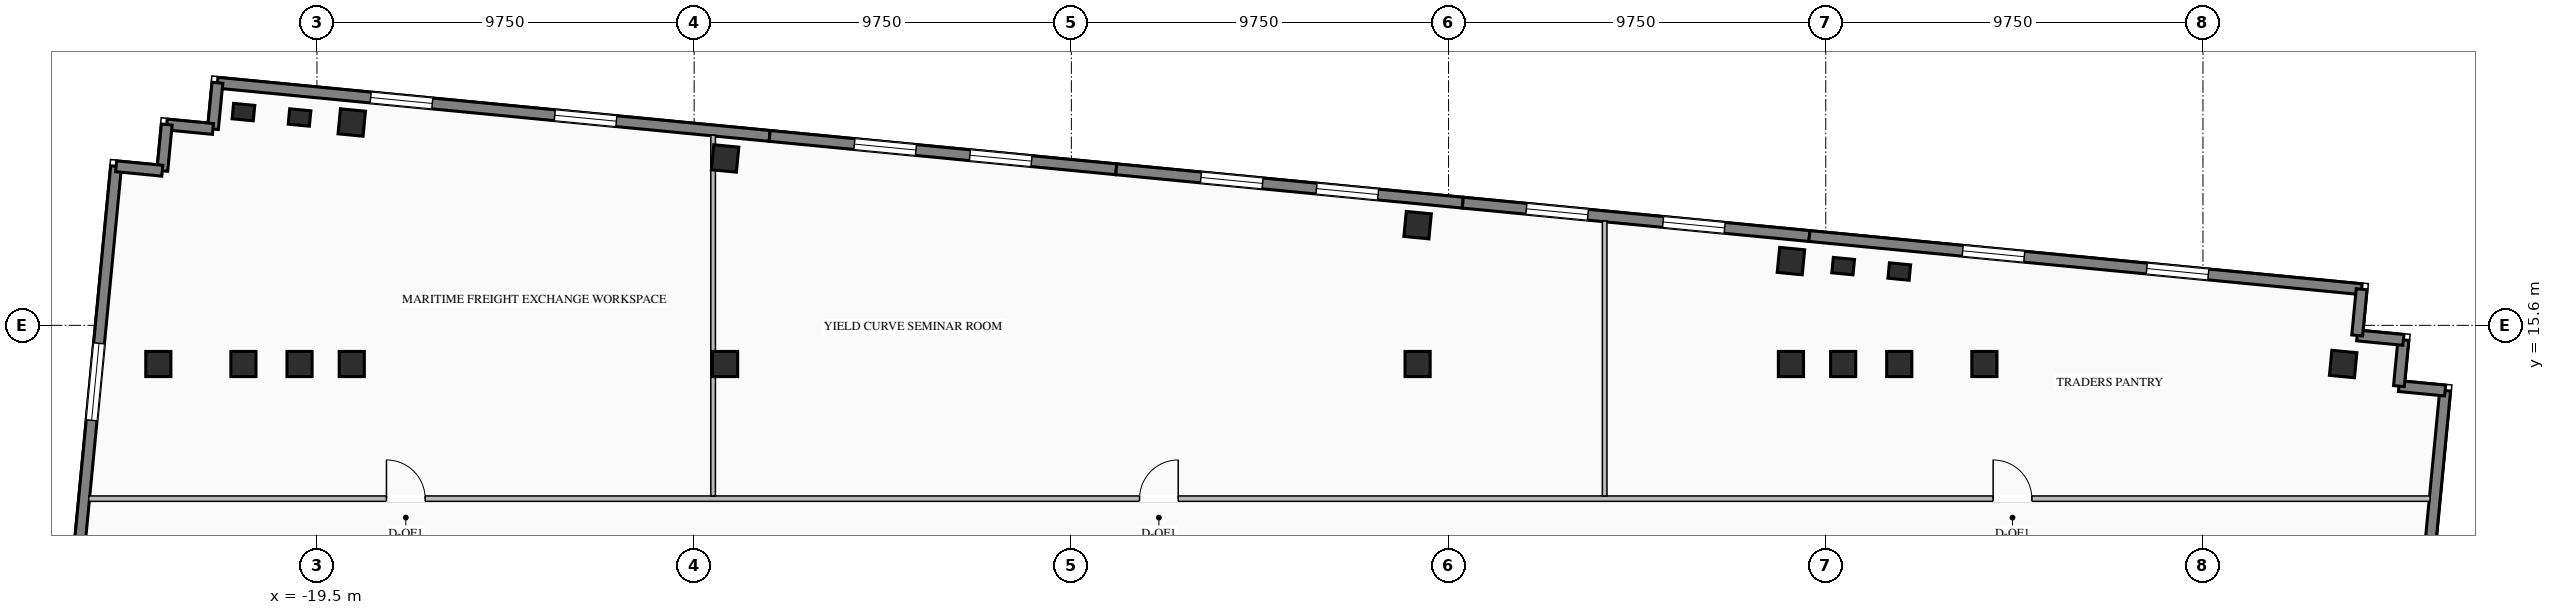
"""IFC4 building model, lengths in metres.
Left out: names, types, materials, properties, quantities, classifications, styles, units other than length and angle.
Written with IfcOpenShell. Run it as: python <this file> out.ifc"""

import sys

from ifc_helpers import new_model, si_unit, direction, frame, frame_2d, origin, origin_2d, place, context, subcontext, project, spatial, rectangle, i_section, extrude, element, fill, save


model = new_model("IFC4")
c1 = context("Model", 3, precision=1e-05, world=origin(), true_north=direction((0.0, 1.0)))
c2 = subcontext(c1, "Body", "Model", "MODEL_VIEW")
j1 = project(units=[si_unit("LENGTHUNIT", "METRE"), si_unit("PLANEANGLEUNIT", "RADIAN")], contexts=[c1])
p1 = place(None, origin())
s1 = spatial("IfcSite", under=j1, at=p1, CompositionType="ELEMENT")
p2 = place(p1, origin())
s2 = spatial("IfcBuilding", under=s1, at=p2, CompositionType="ELEMENT")
p3 = place(p2, frame((0.0, 0.0, 160.4)))
s3 = spatial("IfcBuildingStorey", under=s2, at=p3, CompositionType="ELEMENT", Elevation=160.4)
for number, where, z_axis, x_axis in (
    (1, (-21.4, 14.6, 0.0), (0.0, 0.0, 1.0), (1.0, 0.0, 0.0)),
    (2, (-19.95, 14.6, 0.0), (0.0, 0.0, 1.0), (1.0, 0.0, 0.0)),
    (3, (-18.6, 14.6, 0.0), (0.0, 0.0, 1.0), (1.0, 0.0, 0.0)),
    (4, (-8.95, 14.6, 0.0), (0.0, 0.0, 1.0), (1.0, 0.0, 0.0)),
    (5, (8.95, 14.6, 0.0), (0.0, 0.0, 1.0), (1.0, 0.0, 0.0)),
    (6, (18.6, 14.6, 0.0), (0.0, 0.0, 1.0), (1.0, 0.0, 0.0)),
    (7, (19.95, 14.6, 0.0), (0.0, 0.0, 1.0), (1.0, 0.0, 0.0)),
    (8, (21.4, 14.6, 0.0), (0.0, 0.0, 1.0), (1.0, 0.0, 0.0)),
    (9, (-23.6, 14.6, 0.0), (0.0, 0.0, 1.0), (1.0, 0.0, 0.0)),
    (10, (23.6, 14.6, 0.0), (0.0, 0.0, 1.0), (1.0, 0.0, 0.0)),
    (11, (-18.6, 20.842, 0.0), (0.0, 0.0, 1.0), (0.995, -0.096, 0.0)),
    (12, (-8.95, 19.913, 0.0), (0.0, 0.0, 1.0), (0.995, -0.096, 0.0)),
    (13, (8.95, 18.19, 0.0), (0.0, 0.0, 1.0), (0.995, -0.096, 0.0)),
    (14, (18.6, 17.26, 0.0), (0.0, 0.0, 1.0), (0.995, -0.096, 0.0)),
    (15, (32.874, 14.6, 0.0), (0.0, 0.0, 1.0), (0.995, -0.096, 0.0)),
):
    element("IfcColumn", number, at=place(p3, frame(where, z_axis=z_axis, x_axis=x_axis)), inside=s3, PredefinedType="COLUMN", context=c2, shape_type="SweptSolid", body=[
        extrude(i_section(OverallWidth=0.65, OverallDepth=0.65, WebThickness=0.028, FlangeThickness=0.04, at=origin_2d()), origin(), (0.0, 0.0, 1.0), 3.45),
    ])
for number, where, z_axis, x_axis in (
    (16, (-21.4, 21.112, 0.0), (0.0, 0.0, 1.0), (0.995, -0.096, 0.0)),
    (17, (-19.95, 20.972, 0.0), (0.0, 0.0, 1.0), (0.995, -0.096, 0.0)),
    (18, (19.95, 17.131, 0.0), (0.0, 0.0, 1.0), (0.995, -0.096, 0.0)),
    (19, (21.4, 16.991, 0.0), (0.0, 0.0, 1.0), (0.995, -0.096, 0.0)),
):
    element("IfcColumn", number, at=place(p3, frame(where, z_axis=z_axis, x_axis=x_axis)), inside=s3, PredefinedType="PILASTER", context=c2, shape_type="SweptSolid", body=[
        extrude(rectangle(XDim=0.55, YDim=0.4, at=origin_2d()), origin(), (0.0, 0.0, 1.0), 3.45),
    ])
p4 = place(p3, frame((-22.073, 21.87, 0.0), z_axis=(0.0, 0.0, 1.0), x_axis=(0.995395606285, -0.095851901334, 0.0)))
e20 = element("IfcWall", 20, at=p4, inside=s3, PredefinedType="STANDARD", context=c2, shape_type="SweptSolid", body=[
    extrude(rectangle(XDim=14.34, YDim=0.28, at=frame_2d((7.17, 0.0))), origin(), (0.0, 0.0, 1.0), 3.25),
])
p5 = place(p4, frame((3.98, 0.0, 0.76)))
e21 = element("IfcOpeningElement", 21, at=p5, cuts=e20, PredefinedType="OPENING", context=c2, shape_type="SweptSolid", body=[
    extrude(rectangle(XDim=1.6, YDim=1.95, at=frame_2d((0.8, 0.975))), frame((0.0, 0.15, 0.0), z_axis=(0.0, -1.0, 0.0), x_axis=(1.0, 0.0, 0.0)), (0.0, 0.0, 1.0), 0.3),
])
p6 = place(p4, frame((8.76, 0.0, 0.76)))
e22 = element("IfcOpeningElement", 22, at=p6, cuts=e20, PredefinedType="OPENING", context=c2, shape_type="SweptSolid", body=[
    extrude(rectangle(XDim=1.6, YDim=1.95, at=frame_2d((0.8, 0.975))), frame((0.0, 0.15, 0.0), z_axis=(0.0, -1.0, 0.0), x_axis=(1.0, 0.0, 0.0)), (0.0, 0.0, 1.0), 0.3),
])
p7 = place(p3, frame((-7.799, 20.496, 0.0), z_axis=(0.0, 0.0, 1.0), x_axis=(0.995396794462, -0.09583956164, 0.0)))
e23 = element("IfcWall", 23, at=p7, inside=s3, PredefinedType="STANDARD", context=c2, shape_type="SweptSolid", body=[
    extrude(rectangle(XDim=9.0, YDim=0.28, at=frame_2d((4.5, 0.0))), origin(), (0.0, 0.0, 1.0), 3.25),
])
p8 = place(p7, frame((2.2, 0.0, 0.76)))
e24 = element("IfcOpeningElement", 24, at=p8, cuts=e23, PredefinedType="OPENING", context=c2, shape_type="SweptSolid", body=[
    extrude(rectangle(XDim=1.6, YDim=1.95, at=frame_2d((0.8, 0.975))), frame((0.0, 0.15, 0.0), z_axis=(0.0, -1.0, 0.0), x_axis=(1.0, 0.0, 0.0)), (0.0, 0.0, 1.0), 0.3),
])
p9 = place(p7, frame((5.2, 0.0, 0.76)))
e25 = element("IfcOpeningElement", 25, at=p9, cuts=e23, PredefinedType="OPENING", context=c2, shape_type="SweptSolid", body=[
    extrude(rectangle(XDim=1.6, YDim=1.95, at=frame_2d((0.8, 0.975))), frame((0.0, 0.15, 0.0), z_axis=(0.0, -1.0, 0.0), x_axis=(1.0, 0.0, 0.0)), (0.0, 0.0, 1.0), 0.3),
])
p10 = place(p3, frame((1.16, 19.633, 0.0), z_axis=(0.0, 0.0, 1.0), x_axis=(0.995394455533, -0.09586385082, 0.0)))
e26 = element("IfcWall", 26, at=p10, inside=s3, PredefinedType="STANDARD", context=c2, shape_type="SweptSolid", body=[
    extrude(rectangle(XDim=9.0, YDim=0.28, at=frame_2d((4.5, 0.0))), origin(), (0.0, 0.0, 1.0), 3.25),
])
p11 = place(p10, frame((2.2, 0.0, 0.76)))
e27 = element("IfcOpeningElement", 27, at=p11, cuts=e26, PredefinedType="OPENING", context=c2, shape_type="SweptSolid", body=[
    extrude(rectangle(XDim=1.6, YDim=1.95, at=frame_2d((0.8, 0.975))), frame((0.0, 0.15, 0.0), z_axis=(0.0, -1.0, 0.0), x_axis=(1.0, 0.0, 0.0)), (0.0, 0.0, 1.0), 0.3),
])
p12 = place(p10, frame((5.2, 0.0, 0.76)))
e28 = element("IfcOpeningElement", 28, at=p12, cuts=e26, PredefinedType="OPENING", context=c2, shape_type="SweptSolid", body=[
    extrude(rectangle(XDim=1.6, YDim=1.95, at=frame_2d((0.8, 0.975))), frame((0.0, 0.15, 0.0), z_axis=(0.0, -1.0, 0.0), x_axis=(1.0, 0.0, 0.0)), (0.0, 0.0, 1.0), 0.3),
])
p13 = place(p3, frame((10.119, 18.77, 0.0), z_axis=(0.0, 0.0, 1.0), x_axis=(0.995396794462, -0.09583956164, 0.0)))
e29 = element("IfcWall", 29, at=p13, inside=s3, PredefinedType="STANDARD", context=c2, shape_type="SweptSolid", body=[
    extrude(rectangle(XDim=9.0, YDim=0.28, at=frame_2d((4.5, 0.0))), origin(), (0.0, 0.0, 1.0), 3.25),
])
p14 = place(p13, frame((1.65, 0.0, 0.76)))
e30 = element("IfcOpeningElement", 30, at=p14, cuts=e29, PredefinedType="OPENING", context=c2, shape_type="SweptSolid", body=[
    extrude(rectangle(XDim=1.6, YDim=1.95, at=frame_2d((0.8, 0.975))), frame((0.0, 0.15, 0.0), z_axis=(0.0, -1.0, 0.0), x_axis=(1.0, 0.0, 0.0)), (0.0, 0.0, 1.0), 0.3),
])
p15 = place(p13, frame((5.2, 0.0, 0.76)))
e31 = element("IfcOpeningElement", 31, at=p15, cuts=e29, PredefinedType="OPENING", context=c2, shape_type="SweptSolid", body=[
    extrude(rectangle(XDim=1.6, YDim=1.95, at=frame_2d((0.8, 0.975))), frame((0.0, 0.15, 0.0), z_axis=(0.0, -1.0, 0.0), x_axis=(1.0, 0.0, 0.0)), (0.0, 0.0, 1.0), 0.3),
])
p16 = place(p3, frame((19.077, 17.908, 0.0), z_axis=(0.0, 0.0, 1.0), x_axis=(0.995395606285, -0.095851901334, 0.0)))
e32 = element("IfcWall", 32, at=p16, inside=s3, PredefinedType="STANDARD", context=c2, shape_type="SweptSolid", body=[
    extrude(rectangle(XDim=14.34, YDim=0.28, at=frame_2d((7.17, 0.0))), origin(), (0.0, 0.0, 1.0), 3.25),
])
p17 = place(p16, frame((3.98, 0.0, 0.76)))
e33 = element("IfcOpeningElement", 33, at=p17, cuts=e32, PredefinedType="OPENING", context=c2, shape_type="SweptSolid", body=[
    extrude(rectangle(XDim=1.6, YDim=1.95, at=frame_2d((0.8, 0.975))), frame((0.0, 0.15, 0.0), z_axis=(0.0, -1.0, 0.0), x_axis=(1.0, 0.0, 0.0)), (0.0, 0.0, 1.0), 0.3),
])
p18 = place(p16, frame((8.76, 0.0, 0.76)))
e34 = element("IfcOpeningElement", 34, at=p18, cuts=e32, PredefinedType="OPENING", context=c2, shape_type="SweptSolid", body=[
    extrude(rectangle(XDim=1.6, YDim=1.95, at=frame_2d((0.8, 0.975))), frame((0.0, 0.15, 0.0), z_axis=(0.0, -1.0, 0.0), x_axis=(1.0, 0.0, 0.0)), (0.0, 0.0, 1.0), 0.3),
])
p19 = place(p3, frame((-26.301, 2.998, 0.0), z_axis=(0.0, 0.0, 1.0), x_axis=(0.095837640115, 0.99539697947, 0.0)))
e35 = element("IfcWall", 35, at=p19, inside=s3, PredefinedType="STANDARD", context=c2, shape_type="SweptSolid", body=[
    extrude(rectangle(XDim=16.79, YDim=0.28, at=frame_2d((8.395, 0.0))), origin(), (0.0, 0.0, 1.0), 3.25),
])
p20 = place(p19, frame((3.547, 0.0, 0.76)))
e36 = element("IfcOpeningElement", 36, at=p20, cuts=e35, PredefinedType="OPENING", context=c2, shape_type="SweptSolid", body=[
    extrude(rectangle(XDim=2.0, YDim=2.05, at=frame_2d((1.0, 1.025))), frame((0.0, 0.15, 0.0), z_axis=(0.0, -1.0, 0.0), x_axis=(1.0, 0.0, 0.0)), (0.0, 0.0, 1.0), 0.3),
])
p21 = place(p19, frame((10.193, 0.0, 0.76)))
e37 = element("IfcOpeningElement", 37, at=p21, cuts=e35, PredefinedType="OPENING", context=c2, shape_type="SweptSolid", body=[
    extrude(rectangle(XDim=2.0, YDim=2.05, at=frame_2d((1.0, 1.025))), frame((0.0, 0.15, 0.0), z_axis=(0.0, -1.0, 0.0), x_axis=(1.0, 0.0, 0.0)), (0.0, 0.0, 1.0), 0.3),
])
p22 = place(p3, frame((35.51, 13.914, 0.0), z_axis=(0.0, 0.0, 1.0), x_axis=(-0.095839027265, -0.995396845913, 0.0)))
e38 = element("IfcWall", 38, at=p22, inside=s3, PredefinedType="STANDARD", context=c2, shape_type="SweptSolid", body=[
    extrude(rectangle(XDim=16.79, YDim=0.28, at=frame_2d((8.395, 0.0))), origin(), (0.0, 0.0, 1.0), 3.25),
])
p23 = place(p22, frame((5.647, 0.0, 0.76)))
e39 = element("IfcOpeningElement", 39, at=p23, cuts=e38, PredefinedType="OPENING", context=c2, shape_type="SweptSolid", body=[
    extrude(rectangle(XDim=2.0, YDim=2.05, at=frame_2d((1.0, 1.025))), frame((0.0, 0.15, 0.0), z_axis=(0.0, -1.0, 0.0), x_axis=(1.0, 0.0, 0.0)), (0.0, 0.0, 1.0), 0.3),
])
p24 = place(p22, frame((10.193, 0.0, 0.76)))
e40 = element("IfcOpeningElement", 40, at=p24, cuts=e38, PredefinedType="OPENING", context=c2, shape_type="SweptSolid", body=[
    extrude(rectangle(XDim=2.0, YDim=2.05, at=frame_2d((1.0, 1.025))), frame((0.0, 0.15, 0.0), z_axis=(0.0, -1.0, 0.0), x_axis=(1.0, 0.0, 0.0)), (0.0, 0.0, 1.0), 0.3),
])
p25 = place(p3, frame((35.51, 13.914, 0.0), z_axis=(0.0, 0.0, 1.0), x_axis=(-0.995397091755, 0.095836473879, 0.0)))
e41 = element("IfcWall", 41, at=p25, inside=s3, PredefinedType="STANDARD", context=c2, shape_type="SweptSolid", body=[
    extrude(rectangle(XDim=1.2, YDim=0.28, at=frame_2d((0.6, 0.0))), origin(), (0.0, 0.0, 1.0), 3.25),
])
for number, where, z_axis, x_axis in (
    (42, (34.316, 14.029, 0.0), (0.0, 0.0, 1.0), (0.096, 0.995, 0.0)),
    (43, (34.431, 15.224, 0.0), (0.0, 0.0, 1.0), (-0.995, 0.096, 0.0)),
):
    element("IfcWall", number, at=place(p3, frame(where, z_axis=z_axis, x_axis=x_axis)), inside=s3, PredefinedType="STANDARD", context=c2, shape_type="SweptSolid", body=[
        extrude(rectangle(XDim=1.2, YDim=0.28, at=frame_2d((0.6, 0.0))), origin(), (0.0, 0.0, 1.0), 3.25),
    ])
p26 = place(p3, frame((33.236, 15.339, 0.0), z_axis=(0.0, 0.0, 1.0), x_axis=(0.095836473879, 0.995397091755, 0.0)))
e44 = element("IfcWall", 44, at=p26, inside=s3, PredefinedType="STANDARD", context=c2, shape_type="SweptSolid", body=[
    extrude(rectangle(XDim=1.2, YDim=0.28, at=frame_2d((0.6, 0.0))), origin(), (0.0, 0.0, 1.0), 3.25),
])
for number, where, z_axis, x_axis in (
    (45, (-22.073, 21.87, 0.0), (0.0, 0.0, 1.0), (-0.096, -0.995, 0.0)),
    (46, (-22.188, 20.676, 0.0), (0.0, 0.0, 1.0), (-0.995, 0.096, 0.0)),
    (47, (-23.382, 20.791, 0.0), (0.0, 0.0, 1.0), (-0.096, -0.995, 0.0)),
    (48, (-23.497, 19.596, 0.0), (0.0, 0.0, 1.0), (-0.995, 0.096, 0.0)),
):
    element("IfcWall", number, at=place(p3, frame(where, z_axis=z_axis, x_axis=x_axis)), inside=s3, PredefinedType="STANDARD", context=c2, shape_type="SweptSolid", body=[
        extrude(rectangle(XDim=1.2, YDim=0.28, at=frame_2d((0.6, 0.0))), origin(), (0.0, 0.0, 1.0), 3.25),
    ])
p27 = place(p3, frame((-25.398, 11.12, 0.0), z_axis=(0.0, 0.0, 1.0), x_axis=(1.0, 0.0, 0.0)))
e49 = element("IfcWall", 49, at=p27, inside=s3, PredefinedType="STANDARD", context=c2, shape_type="SweptSolid", body=[
    extrude(rectangle(XDim=60.519, YDim=0.14, at=frame_2d((30.259, 0.0))), origin(), (0.0, 0.0, 1.0), 3.25),
])
p28 = place(p27, frame((7.695, 0.0, 0.0)))
e50 = element("IfcOpeningElement", 50, at=p28, cuts=e49, PredefinedType="OPENING", context=c2, shape_type="SweptSolid", body=[
    extrude(rectangle(XDim=1.0, YDim=2.08, at=frame_2d((0.5, 1.04))), frame((0.0, 0.08, 0.0), z_axis=(0.0, -1.0, 0.0), x_axis=(1.0, 0.0, 0.0)), (0.0, 0.0, 1.0), 0.16),
])
p29 = place(p27, frame((27.161, 0.0, 0.0)))
e51 = element("IfcOpeningElement", 51, at=p29, cuts=e49, PredefinedType="OPENING", context=c2, shape_type="SweptSolid", body=[
    extrude(rectangle(XDim=1.0, YDim=2.08, at=frame_2d((0.5, 1.04))), frame((0.0, 0.08, 0.0), z_axis=(0.0, -1.0, 0.0), x_axis=(1.0, 0.0, 0.0)), (0.0, 0.0, 1.0), 0.16),
])
p30 = place(p27, frame((49.225, 0.0, 0.0)))
e52 = element("IfcOpeningElement", 52, at=p30, cuts=e49, PredefinedType="OPENING", context=c2, shape_type="SweptSolid", body=[
    extrude(rectangle(XDim=1.0, YDim=2.08, at=frame_2d((0.5, 1.04))), frame((0.0, 0.08, 0.0), z_axis=(0.0, -1.0, 0.0), x_axis=(1.0, 0.0, 0.0)), (0.0, 0.0, 1.0), 0.16),
])
p31 = place(p3, frame((-9.26, 11.19, 0.0), z_axis=(0.0, 0.0, 1.0), x_axis=(0.0, 1.0, 0.0)))
e53 = element("IfcWall", 53, at=p31, inside=s3, PredefinedType="STANDARD", context=c2, shape_type="SweptSolid", body=[
    extrude(rectangle(XDim=9.326, YDim=0.12, at=frame_2d((4.663, 0.0))), origin(), (0.0, 0.0, 1.0), 3.25),
])
p32 = place(p3, frame((13.785, 11.19, 0.0), z_axis=(0.0, 0.0, 1.0), x_axis=(0.0, 1.0, 0.0)))
e54 = element("IfcWall", 54, at=p32, inside=s3, PredefinedType="STANDARD", context=c2, shape_type="SweptSolid", body=[
    extrude(rectangle(XDim=7.107, YDim=0.12, at=frame_2d((3.553, 0.0))), origin(), (0.0, 0.0, 1.0), 3.25),
])
p33 = place(p5, origin())
e55 = element("IfcWindow", 55, at=p33, inside=s3, PartitioningType="SINGLE_PANEL", PredefinedType="WINDOW", context=c2, shape_type="SweptSolid", body=[
    extrude(rectangle(XDim=1.6, YDim=1.95, at=frame_2d((0.8, 0.975))), frame((0.0, 0.03, 0.0), z_axis=(0.0, -1.0, 0.0), x_axis=(1.0, 0.0, 0.0)), (0.0, 0.0, 1.0), 0.06),
])
fill(e21, e55)
p34 = place(p6, origin())
e56 = element("IfcWindow", 56, at=p34, inside=s3, PartitioningType="SINGLE_PANEL", PredefinedType="WINDOW", context=c2, shape_type="SweptSolid", body=[
    extrude(rectangle(XDim=1.6, YDim=1.95, at=frame_2d((0.8, 0.975))), frame((0.0, 0.03, 0.0), z_axis=(0.0, -1.0, 0.0), x_axis=(1.0, 0.0, 0.0)), (0.0, 0.0, 1.0), 0.06),
])
fill(e22, e56)
p35 = place(p8, origin())
e57 = element("IfcWindow", 57, at=p35, inside=s3, PartitioningType="SINGLE_PANEL", PredefinedType="WINDOW", context=c2, shape_type="SweptSolid", body=[
    extrude(rectangle(XDim=1.6, YDim=1.95, at=frame_2d((0.8, 0.975))), frame((0.0, 0.03, 0.0), z_axis=(0.0, -1.0, 0.0), x_axis=(1.0, 0.0, 0.0)), (0.0, 0.0, 1.0), 0.06),
])
fill(e24, e57)
p36 = place(p9, origin())
e58 = element("IfcWindow", 58, at=p36, inside=s3, PartitioningType="SINGLE_PANEL", PredefinedType="WINDOW", context=c2, shape_type="SweptSolid", body=[
    extrude(rectangle(XDim=1.6, YDim=1.95, at=frame_2d((0.8, 0.975))), frame((0.0, 0.03, 0.0), z_axis=(0.0, -1.0, 0.0), x_axis=(1.0, 0.0, 0.0)), (0.0, 0.0, 1.0), 0.06),
])
fill(e25, e58)
p37 = place(p11, origin())
e59 = element("IfcWindow", 59, at=p37, inside=s3, PartitioningType="SINGLE_PANEL", PredefinedType="WINDOW", context=c2, shape_type="SweptSolid", body=[
    extrude(rectangle(XDim=1.6, YDim=1.95, at=frame_2d((0.8, 0.975))), frame((0.0, 0.03, 0.0), z_axis=(0.0, -1.0, 0.0), x_axis=(1.0, 0.0, 0.0)), (0.0, 0.0, 1.0), 0.06),
])
fill(e27, e59)
p38 = place(p12, origin())
e60 = element("IfcWindow", 60, at=p38, inside=s3, PartitioningType="SINGLE_PANEL", PredefinedType="WINDOW", context=c2, shape_type="SweptSolid", body=[
    extrude(rectangle(XDim=1.6, YDim=1.95, at=frame_2d((0.8, 0.975))), frame((0.0, 0.03, 0.0), z_axis=(0.0, -1.0, 0.0), x_axis=(1.0, 0.0, 0.0)), (0.0, 0.0, 1.0), 0.06),
])
fill(e28, e60)
p39 = place(p14, origin())
e61 = element("IfcWindow", 61, at=p39, inside=s3, PartitioningType="SINGLE_PANEL", PredefinedType="WINDOW", context=c2, shape_type="SweptSolid", body=[
    extrude(rectangle(XDim=1.6, YDim=1.95, at=frame_2d((0.8, 0.975))), frame((0.0, 0.03, 0.0), z_axis=(0.0, -1.0, 0.0), x_axis=(1.0, 0.0, 0.0)), (0.0, 0.0, 1.0), 0.06),
])
fill(e30, e61)
p40 = place(p15, origin())
e62 = element("IfcWindow", 62, at=p40, inside=s3, PartitioningType="SINGLE_PANEL", PredefinedType="WINDOW", context=c2, shape_type="SweptSolid", body=[
    extrude(rectangle(XDim=1.6, YDim=1.95, at=frame_2d((0.8, 0.975))), frame((0.0, 0.03, 0.0), z_axis=(0.0, -1.0, 0.0), x_axis=(1.0, 0.0, 0.0)), (0.0, 0.0, 1.0), 0.06),
])
fill(e31, e62)
p41 = place(p17, origin())
e63 = element("IfcWindow", 63, at=p41, inside=s3, PartitioningType="SINGLE_PANEL", PredefinedType="WINDOW", context=c2, shape_type="SweptSolid", body=[
    extrude(rectangle(XDim=1.6, YDim=1.95, at=frame_2d((0.8, 0.975))), frame((0.0, 0.03, 0.0), z_axis=(0.0, -1.0, 0.0), x_axis=(1.0, 0.0, 0.0)), (0.0, 0.0, 1.0), 0.06),
])
fill(e33, e63)
p42 = place(p18, origin())
e64 = element("IfcWindow", 64, at=p42, inside=s3, PartitioningType="SINGLE_PANEL", PredefinedType="WINDOW", context=c2, shape_type="SweptSolid", body=[
    extrude(rectangle(XDim=1.6, YDim=1.95, at=frame_2d((0.8, 0.975))), frame((0.0, 0.03, 0.0), z_axis=(0.0, -1.0, 0.0), x_axis=(1.0, 0.0, 0.0)), (0.0, 0.0, 1.0), 0.06),
])
fill(e34, e64)
p43 = place(p21, origin())
e65 = element("IfcWindow", 65, at=p43, inside=s3, PartitioningType="DOUBLE_PANEL_VERTICAL", PredefinedType="WINDOW", context=c2, shape_type="SweptSolid", body=[
    extrude(rectangle(XDim=2.0, YDim=2.05, at=frame_2d((1.0, 1.025))), frame((0.0, 0.03, 0.0), z_axis=(0.0, -1.0, 0.0), x_axis=(1.0, 0.0, 0.0)), (0.0, 0.0, 1.0), 0.06),
])
fill(e37, e65)
p44 = place(p28, origin())
e66 = element("IfcDoor", 66, at=p44, inside=s3, OperationType="SINGLE_SWING_LEFT", PredefinedType="DOOR", context=c2, shape_type="SweptSolid", body=[
    extrude(rectangle(XDim=1.0, YDim=2.08, at=frame_2d((0.5, 1.04))), frame((0.0, 0.025, 0.0), z_axis=(0.0, -1.0, 0.0), x_axis=(1.0, 0.0, 0.0)), (0.0, 0.0, 1.0), 0.05),
])
fill(e50, e66)
p45 = place(p29, origin())
e67 = element("IfcDoor", 67, at=p45, inside=s3, OperationType="SINGLE_SWING_RIGHT", PredefinedType="DOOR", context=c2, shape_type="SweptSolid", body=[
    extrude(rectangle(XDim=1.0, YDim=2.08, at=frame_2d((0.5, 1.04))), frame((0.0, 0.025, 0.0), z_axis=(0.0, -1.0, 0.0), x_axis=(1.0, 0.0, 0.0)), (0.0, 0.0, 1.0), 0.05),
])
fill(e51, e67)
p46 = place(p30, origin())
e68 = element("IfcDoor", 68, at=p46, inside=s3, OperationType="SINGLE_SWING_LEFT", PredefinedType="DOOR", context=c2, shape_type="SweptSolid", body=[
    extrude(rectangle(XDim=1.0, YDim=2.08, at=frame_2d((0.5, 1.04))), frame((0.0, 0.025, 0.0), z_axis=(0.0, -1.0, 0.0), x_axis=(1.0, 0.0, 0.0)), (0.0, 0.0, 1.0), 0.05),
])
fill(e52, e68)
save(model, sys.argv[1])
